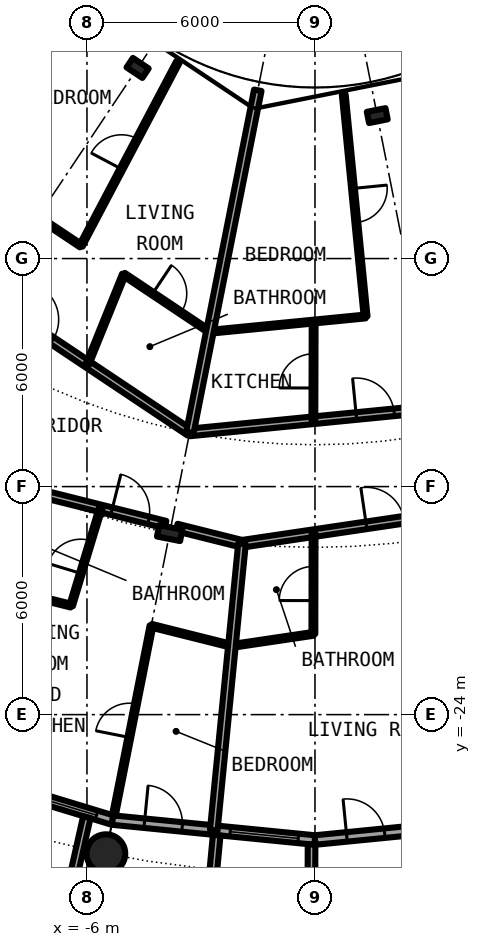
"""IFC4 building model, lengths in metres.
Left out: names, types, materials, properties, quantities, classifications, styles, units other than length and angle.
Written with IfcOpenShell. Run it as: python <this file> out.ifc"""

import sys

from ifc_helpers import new_model, si_unit, direction, frame, frame_2d, origin, origin_2d, place, context, subcontext, project, spatial, rectangle, hollow_circle, i_section, extrude, element, fill, save


model = new_model("IFC4")
c1 = context("Model", 3, precision=1e-05, world=origin(), true_north=direction((0.0, 1.0)))
c2 = subcontext(c1, "Body", "Model", "MODEL_VIEW")
j1 = project(units=[si_unit("LENGTHUNIT", "METRE"), si_unit("PLANEANGLEUNIT", "RADIAN")], contexts=[c1])
p1 = place(None, origin())
s1 = spatial("IfcSite", under=j1, at=p1, CompositionType="ELEMENT")
p2 = place(p1, origin())
s2 = spatial("IfcBuilding", under=s1, at=p2, CompositionType="ELEMENT")
p3 = place(p2, frame((0.0, 0.0, 35.0)))
s3 = spatial("IfcBuildingStorey", under=s2, at=p3, CompositionType="ELEMENT", Elevation=35.0)
p4 = place(p3, frame((-5.501, -27.658, 0.0), z_axis=(0.0, 0.0, 1.0), x_axis=(1.0, 0.0, 0.0)))
e1 = element("IfcColumn", 1, at=p4, inside=s3, PredefinedType="COLUMN", context=c2, shape_type="SweptSolid", body=[
    extrude(hollow_circle(Radius=0.508, WallThickness=0.05, at=origin_2d()), origin(), (0.0, 0.0, 1.0), 3.05),
])
p5 = place(p3, frame((-3.824, -19.223, 0.0), z_axis=(0.0, 0.0, 1.0), x_axis=(-0.195090322016, -0.980785280403, 0.0)))
e2 = element("IfcColumn", 2, at=p5, inside=s3, PredefinedType="COLUMN", context=c2, shape_type="SweptSolid", body=[
    extrude(i_section(OverallWidth=0.305, OverallDepth=0.62, WebThickness=0.021, FlangeThickness=0.04, FilletRadius=0.027, at=origin_2d()), origin(), (0.0, 0.0, 1.0), 3.05),
])
for number, where, z_axis, x_axis in (
    (3, (-4.667, -6.984, 0.0), (0.0, 0.0, 1.0), (-0.556, -0.831, 0.0)),
    (4, (1.639, -8.239, 0.0), (0.0, 0.0, 1.0), (0.195, -0.981, 0.0)),
):
    element("IfcColumn", number, at=place(p3, frame(where, z_axis=z_axis, x_axis=x_axis)), inside=s3, PredefinedType="COLUMN", context=c2, shape_type="SweptSolid", body=[
        extrude(i_section(OverallWidth=0.3, OverallDepth=0.5, WebThickness=0.014, FlangeThickness=0.028, FilletRadius=0.027, at=origin_2d()), origin(), (0.0, 0.0, 1.0), 3.05),
    ])
p6 = place(p3, frame((-10.447, -25.222, 0.0), z_axis=(0.0, 0.0, 1.0), x_axis=(0.956965678721, -0.290201119486, 0.0)))
e5 = element("IfcWall", 5, at=p6, inside=s3, PredefinedType="SOLIDWALL", context=c2, shape_type="SweptSolid", body=[
    extrude(rectangle(XDim=5.351, YDim=0.25, at=frame_2d((2.676, 0.0))), origin(), (0.0, 0.0, 1.0), 2.7),
])
p7 = place(p6, frame((0.841, 0.0, 0.0)))
e6 = element("IfcOpeningElement", 6, at=p7, cuts=e5, PredefinedType="OPENING", context=c2, shape_type="SweptSolid", body=[
    extrude(rectangle(XDim=1.0, YDim=2.2, at=frame_2d((0.5, 1.1))), frame((0.0, 0.135, 0.0), z_axis=(0.0, -1.0, 0.0), x_axis=(1.0, 0.0, 0.0)), (0.0, 0.0, 1.0), 0.27),
])
p8 = place(p6, frame((3.111, 0.0, 0.3)))
e7 = element("IfcOpeningElement", 7, at=p8, cuts=e5, PredefinedType="OPENING", context=c2, shape_type="SweptSolid", body=[
    extrude(rectangle(XDim=1.8, YDim=2.1, at=frame_2d((0.9, 1.05))), frame((0.0, 0.135, 0.0), z_axis=(0.0, -1.0, 0.0), x_axis=(1.0, 0.0, 0.0)), (0.0, 0.0, 1.0), 0.27),
])
p9 = place(p3, frame((-6.004, -26.7, -0.03), z_axis=(0.0, 0.0, 1.0), x_axis=(-0.219609259383, -0.975587911566, 0.0)))
e8 = element("IfcWall", 8, at=p9, inside=s3, PredefinedType="SOLIDWALL", context=c2, shape_type="SweptSolid", body=[
    extrude(rectangle(XDim=2.933, YDim=0.2, at=frame_2d((1.466, 0.0))), origin(), (0.0, 0.0, 1.0), 2.73),
])
p10 = place(p3, frame((-5.326, -26.775, 0.0), z_axis=(0.0, 0.0, 1.0), x_axis=(0.995173996315, -0.098126026407, 0.0)))
e9 = element("IfcWall", 9, at=p10, inside=s3, PredefinedType="SOLIDWALL", context=c2, shape_type="SweptSolid", body=[
    extrude(rectangle(XDim=5.352, YDim=0.25, at=frame_2d((2.676, 0.0))), origin(), (0.0, 0.0, 1.0), 2.7),
])
p11 = place(p10, frame((0.841, 0.0, 0.0)))
e10 = element("IfcOpeningElement", 10, at=p11, cuts=e9, PredefinedType="OPENING", context=c2, shape_type="SweptSolid", body=[
    extrude(rectangle(XDim=1.0, YDim=2.2, at=frame_2d((0.5, 1.1))), frame((0.0, 0.135, 0.0), z_axis=(0.0, -1.0, 0.0), x_axis=(1.0, 0.0, 0.0)), (0.0, 0.0, 1.0), 0.27),
])
p12 = place(p10, frame((3.111, 0.0, 0.3)))
e11 = element("IfcOpeningElement", 11, at=p12, cuts=e9, PredefinedType="OPENING", context=c2, shape_type="SweptSolid", body=[
    extrude(rectangle(XDim=1.8, YDim=2.1, at=frame_2d((0.9, 1.05))), frame((0.0, 0.135, 0.0), z_axis=(0.0, -1.0, 0.0), x_axis=(1.0, 0.0, 0.0)), (0.0, 0.0, 1.0), 0.27),
])
p13 = place(p3, frame((-2.586, -27.171, -0.03), z_axis=(0.0, 0.0, 1.0), x_axis=(-0.094548432284, -0.995520262954, 0.0)))
e12 = element("IfcWall", 12, at=p13, inside=s3, PredefinedType="SOLIDWALL", context=c2, shape_type="SweptSolid", body=[
    extrude(rectangle(XDim=3.006, YDim=0.2, at=frame_2d((1.503, 0.0))), origin(), (0.0, 0.0, 1.0), 2.73),
])
p14 = place(p3, frame((-0.09, -27.417, -0.03), z_axis=(0.0, 0.0, 1.0), x_axis=(-0.00347308367, -0.999993968827, 0.0)))
e13 = element("IfcWall", 13, at=p14, inside=s3, PredefinedType="SOLIDWALL", context=c2, shape_type="SweptSolid", body=[
    extrude(rectangle(XDim=2.882, YDim=0.2, at=frame_2d((1.441, 0.0))), origin(), (0.0, 0.0, 1.0), 2.73),
])
p15 = place(p3, frame((0.0, -27.3, 0.0), z_axis=(0.0, 0.0, 1.0), x_axis=(0.995173996315, 0.098126026407, 0.0)))
e14 = element("IfcWall", 14, at=p15, inside=s3, PredefinedType="SOLIDWALL", context=c2, shape_type="SweptSolid", body=[
    extrude(rectangle(XDim=5.352, YDim=0.25, at=frame_2d((2.676, 0.0))), origin(), (0.0, 0.0, 1.0), 2.7),
])
p16 = place(p15, frame((0.841, 0.0, 0.0)))
e15 = element("IfcOpeningElement", 15, at=p16, cuts=e14, PredefinedType="OPENING", context=c2, shape_type="SweptSolid", body=[
    extrude(rectangle(XDim=1.0, YDim=2.2, at=frame_2d((0.5, 1.1))), frame((0.0, 0.135, 0.0), z_axis=(0.0, -1.0, 0.0), x_axis=(1.0, 0.0, 0.0)), (0.0, 0.0, 1.0), 0.27),
])
p17 = place(p15, frame((3.111, 0.0, 0.3)))
e16 = element("IfcOpeningElement", 16, at=p17, cuts=e14, PredefinedType="OPENING", context=c2, shape_type="SweptSolid", body=[
    extrude(rectangle(XDim=1.8, YDim=2.1, at=frame_2d((0.9, 1.05))), frame((0.0, 0.135, 0.0), z_axis=(0.0, -1.0, 0.0), x_axis=(1.0, 0.0, 0.0)), (0.0, 0.0, 1.0), 0.27),
])
for number, where, z_axis, x_axis in (
    (17, (-8.534, -20.603, 0.0), (0.0, 0.0, 1.0), (0.97, -0.243, 0.0)),
    (18, (-4.302, -21.663, 0.0), (0.0, 0.0, 1.0), (0.97, -0.243, 0.0)),
):
    element("IfcWall", number, at=place(p3, frame(where, z_axis=z_axis, x_axis=x_axis)), inside=s3, PredefinedType="PARTITIONING", context=c2, shape_type="SweptSolid", body=[
        extrude(rectangle(XDim=2.181, YDim=0.1, at=frame_2d((1.091, 0.0))), origin(), (0.0, 0.0, 1.0), 2.7),
    ])
p18 = place(p3, frame((-2.186, -22.193, 0.0), z_axis=(0.0, 0.0, 1.0), x_axis=(0.989171386505, 0.146765009863, 0.0)))
e19 = element("IfcWall", 19, at=p18, inside=s3, PredefinedType="PARTITIONING", context=c2, shape_type="SweptSolid", body=[
    extrude(rectangle(XDim=2.167, YDim=0.1, at=frame_2d((1.084, 0.0))), origin(), (0.0, 0.0, 1.0), 2.7),
])
p19 = place(p3, frame((-7.501, -18.108, 0.0), z_axis=(0.0, 0.0, 1.0), x_axis=(0.970040840928, -0.242941900323, 0.0)))
e20 = element("IfcWall", 20, at=p19, inside=s3, PredefinedType="PARTITIONING", context=c2, shape_type="SweptSolid", body=[
    extrude(rectangle(XDim=3.676, YDim=0.2, at=frame_2d((1.838, 0.0))), origin(), (0.0, 0.0, 1.0), 2.38),
])
p20 = place(p19, frame((2.217, 0.0, 0.0)))
e21 = element("IfcOpeningElement", 21, at=p20, cuts=e20, PredefinedType="OPENING", context=c2, shape_type="SweptSolid", body=[
    extrude(rectangle(XDim=1.0, YDim=2.3, at=frame_2d((0.5, 1.15))), frame((0.0, 0.11, 0.0), z_axis=(0.0, -1.0, 0.0), x_axis=(1.0, 0.0, 0.0)), (0.0, 0.0, 1.0), 0.22),
])
p21 = place(p3, frame((-3.639, -19.076, 0.0), z_axis=(0.0, 0.0, 1.0), x_axis=(0.970053237222, -0.242892397895, 0.0)))
e22 = element("IfcWall", 22, at=p21, inside=s3, PredefinedType="PARTITIONING", context=c2, shape_type="SweptSolid", body=[
    extrude(rectangle(XDim=1.771, YDim=0.2, at=frame_2d((0.885, 0.0))), origin(), (0.0, 0.0, 1.0), 2.38),
])
p22 = place(p3, frame((-1.927, -19.506, 0.0), z_axis=(0.0, 0.0, 1.0), x_axis=(0.989181308547, 0.146698121399, 0.0)))
e23 = element("IfcWall", 23, at=p22, inside=s3, PredefinedType="PARTITIONING", context=c2, shape_type="SweptSolid", body=[
    extrude(rectangle(XDim=9.531, YDim=0.2, at=frame_2d((4.766, 0.0))), origin(), (0.0, 0.0, 1.0), 2.38),
])
p23 = place(p22, frame((3.316, 0.0, 0.0)))
e24 = element("IfcOpeningElement", 24, at=p23, cuts=e23, PredefinedType="OPENING", context=c2, shape_type="SweptSolid", body=[
    extrude(rectangle(XDim=1.0, YDim=2.3, at=frame_2d((0.5, 1.15))), frame((0.0, 0.11, 0.0), z_axis=(0.0, -1.0, 0.0), x_axis=(1.0, 0.0, 0.0)), (0.0, 0.0, 1.0), 0.22),
])
p24 = place(p3, frame((-3.297, -16.575, 0.0), z_axis=(0.0, 0.0, 1.0), x_axis=(0.995201860711, 0.097843019361, 0.0)))
e25 = element("IfcWall", 25, at=p24, inside=s3, PredefinedType="PARTITIONING", context=c2, shape_type="SweptSolid", body=[
    extrude(rectangle(XDim=9.811, YDim=0.2, at=frame_2d((4.906, 0.0))), origin(), (0.0, 0.0, 1.0), 2.7),
])
p25 = place(p24, frame((4.406, 0.0, 0.0)))
e26 = element("IfcOpeningElement", 26, at=p25, cuts=e25, PredefinedType="OPENING", context=c2, shape_type="SweptSolid", body=[
    extrude(rectangle(XDim=1.0, YDim=2.3, at=frame_2d((0.5, 1.15))), frame((0.0, 0.11, 0.0), z_axis=(0.0, -1.0, 0.0), x_axis=(1.0, 0.0, 0.0)), (0.0, 0.0, 1.0), 0.22),
])
p26 = place(p3, frame((-14.036, -9.402, 0.0), z_axis=(0.0, 0.0, 1.0), x_axis=(0.831561346449, -0.555432918625, 0.0)))
e27 = element("IfcWall", 27, at=p26, inside=s3, PredefinedType="PARTITIONING", context=c2, shape_type="SweptSolid", body=[
    extrude(rectangle(XDim=12.914, YDim=0.2, at=frame_2d((6.457, 0.0))), origin(), (0.0, 0.0, 1.0), 2.7),
])
p27 = place(p26, frame((7.566, 0.0, 0.0)))
e28 = element("IfcOpeningElement", 28, at=p27, cuts=e27, PredefinedType="OPENING", context=c2, shape_type="SweptSolid", body=[
    extrude(rectangle(XDim=1.0, YDim=2.3, at=frame_2d((0.5, 1.15))), frame((0.0, 0.11, 0.0), z_axis=(0.0, -1.0, 0.0), x_axis=(1.0, 0.0, 0.0)), (0.0, 0.0, 1.0), 0.22),
])
p28 = place(p3, frame((-2.772, -13.927, 0.0), z_axis=(0.0, 0.0, 1.0), x_axis=(0.995206960104, 0.097791137432, 0.0)))
e29 = element("IfcWall", 29, at=p28, inside=s3, PredefinedType="PARTITIONING", context=c2, shape_type="SweptSolid", body=[
    extrude(rectangle(XDim=4.122, YDim=0.1, at=frame_2d((2.061, 0.0))), origin(), (0.0, 0.0, 1.0), 2.7),
])
p29 = place(p3, frame((-9.545, -9.401, 0.0), z_axis=(0.0, 0.0, 1.0), x_axis=(0.831459707426, -0.555585056429, 0.0)))
e30 = element("IfcWall", 30, at=p29, inside=s3, PredefinedType="PARTITIONING", context=c2, shape_type="SweptSolid", body=[
    extrude(rectangle(XDim=4.073, YDim=0.1, at=frame_2d((2.037, 0.0))), origin(), (0.0, 0.0, 1.0), 2.7),
])
p30 = place(p3, frame((-5.029, -12.418, 0.0), z_axis=(0.0, 0.0, 1.0), x_axis=(0.831538390496, -0.555467285384, 0.0)))
e31 = element("IfcWall", 31, at=p30, inside=s3, PredefinedType="PARTITIONING", context=c2, shape_type="SweptSolid", body=[
    extrude(rectangle(XDim=2.717, YDim=0.1, at=frame_2d((1.358, 0.0))), origin(), (0.0, 0.0, 1.0), 2.7),
])
p31 = place(p30, frame((0.908, 0.0, 0.0)))
e32 = element("IfcOpeningElement", 32, at=p31, cuts=e31, PredefinedType="OPENING", context=c2, shape_type="SweptSolid", body=[
    extrude(rectangle(XDim=0.9, YDim=2.3, at=frame_2d((0.45, 1.15))), frame((0.0, 0.06, 0.0), z_axis=(0.0, -1.0, 0.0), x_axis=(1.0, 0.0, 0.0)), (0.0, 0.0, 1.0), 0.12),
])
p32 = place(p3, frame((-6.418, -21.133, 0.0), z_axis=(0.0, 0.0, 1.0), x_axis=(0.290478618436, 0.956881482855, 0.0)))
e33 = element("IfcWall", 33, at=p32, inside=s3, PredefinedType="PARTITIONING", context=c2, shape_type="SweptSolid", body=[
    extrude(rectangle(XDim=2.674, YDim=0.1, at=frame_2d((1.337, 0.0))), origin(), (0.0, 0.0, 1.0), 2.7),
])
p33 = place(p32, frame((0.887, 0.0, 0.0)))
e34 = element("IfcOpeningElement", 34, at=p33, cuts=e33, PredefinedType="OPENING", context=c2, shape_type="SweptSolid", body=[
    extrude(rectangle(XDim=0.9, YDim=2.3, at=frame_2d((0.45, 1.15))), frame((0.0, 0.06, 0.0), z_axis=(0.0, -1.0, 0.0), x_axis=(1.0, 0.0, 0.0)), (0.0, 0.0, 1.0), 0.12),
])
p34 = place(p3, frame((-6.159, -11.663, 0.0), z_axis=(0.0, 0.0, 1.0), x_axis=(0.466976820365, 0.884269556889, 0.0)))
e35 = element("IfcWall", 35, at=p34, inside=s3, PredefinedType="PARTITIONING", context=c2, shape_type="SweptSolid", body=[
    extrude(rectangle(XDim=5.469, YDim=0.1, at=frame_2d((2.735, 0.0))), origin(), (0.0, 0.0, 1.0), 2.7),
])
p35 = place(p34, frame((2.284, 0.0, 0.0)))
e36 = element("IfcOpeningElement", 36, at=p35, cuts=e35, PredefinedType="OPENING", context=c2, shape_type="SweptSolid", body=[
    extrude(rectangle(XDim=0.9, YDim=2.3, at=frame_2d((0.45, 1.15))), frame((0.0, 0.06, 0.0), z_axis=(0.0, -1.0, 0.0), x_axis=(1.0, 0.0, 0.0)), (0.0, 0.0, 1.0), 0.12),
])
p36 = place(p3, frame((-5.986, -14.779, 0.0), z_axis=(0.0, 0.0, 1.0), x_axis=(0.375649498413, 0.926761811008, 0.0)))
e37 = element("IfcWall", 37, at=p36, inside=s3, PredefinedType="PARTITIONING", context=c2, shape_type="SweptSolid", body=[
    extrude(rectangle(XDim=2.548, YDim=0.1, at=frame_2d((1.274, 0.0))), origin(), (0.0, 0.0, 1.0), 2.7),
])
p37 = place(p3, frame((-5.293, -26.655, 0.0), z_axis=(0.0, 0.0, 1.0), x_axis=(0.194713709563, 0.980860118115, 0.0)))
e38 = element("IfcWall", 38, at=p37, inside=s3, PredefinedType="PARTITIONING", context=c2, shape_type="SweptSolid", body=[
    extrude(rectangle(XDim=5.089, YDim=0.1, at=frame_2d((2.545, 0.0))), origin(), (0.0, 0.0, 1.0), 2.7),
])
p38 = place(p37, frame((2.095, 0.0, 0.0)))
e39 = element("IfcOpeningElement", 39, at=p38, cuts=e38, PredefinedType="OPENING", context=c2, shape_type="SweptSolid", body=[
    extrude(rectangle(XDim=0.9, YDim=2.3, at=frame_2d((0.45, 1.15))), frame((0.0, 0.06, 0.0), z_axis=(0.0, -1.0, 0.0), x_axis=(1.0, 0.0, 0.0)), (0.0, 0.0, 1.0), 0.12),
])
p39 = place(p3, frame((-3.292, -16.576, 0.0), z_axis=(0.0, 0.0, 1.0), x_axis=(0.194683825545, 0.980866050015, 0.0)))
e40 = element("IfcWall", 40, at=p39, inside=s3, PredefinedType="PARTITIONING", context=c2, shape_type="SweptSolid", body=[
    extrude(rectangle(XDim=9.179, YDim=0.2, at=frame_2d((4.59, 0.0))), origin(), (0.0, 0.0, 1.0), 2.7),
])
p40 = place(p3, frame((-2.664, -27.044, 0.0), z_axis=(0.0, 0.0, 1.0), x_axis=(0.098115395479, 0.995175044487, 0.0)))
e41 = element("IfcWall", 41, at=p40, inside=s3, PredefinedType="PARTITIONING", context=c2, shape_type="SweptSolid", body=[
    extrude(rectangle(XDim=7.574, YDim=0.2, at=frame_2d((3.787, 0.0))), origin(), (0.0, 0.0, 1.0), 2.7),
])
p41 = place(p3, frame((-0.042, -21.875, 0.0), z_axis=(0.0, 0.0, 1.0), x_axis=(0.001843314841, 0.999998301094, 0.0)))
e42 = element("IfcWall", 42, at=p41, inside=s3, PredefinedType="PARTITIONING", context=c2, shape_type="SweptSolid", body=[
    extrude(rectangle(XDim=2.649, YDim=0.1, at=frame_2d((1.324, 0.0))), origin(), (0.0, 0.0, 1.0), 2.7),
])
p42 = place(p41, frame((0.875, 0.0, 0.0)))
e43 = element("IfcOpeningElement", 43, at=p42, cuts=e42, PredefinedType="OPENING", context=c2, shape_type="SweptSolid", body=[
    extrude(rectangle(XDim=0.9, YDim=2.3, at=frame_2d((0.45, 1.15))), frame((0.0, 0.06, 0.0), z_axis=(0.0, -1.0, 0.0), x_axis=(1.0, 0.0, 0.0)), (0.0, 0.0, 1.0), 0.12),
])
p43 = place(p3, frame((-0.042, -16.255, 0.0), z_axis=(0.0, 0.0, 1.0), x_axis=(0.00272632248, 0.999996283576, 0.0)))
e44 = element("IfcWall", 44, at=p43, inside=s3, PredefinedType="PARTITIONING", context=c2, shape_type="SweptSolid", body=[
    extrude(rectangle(XDim=2.597, YDim=0.1, at=frame_2d((1.298, 0.0))), origin(), (0.0, 0.0, 1.0), 2.7),
])
p44 = place(p43, frame((0.849, 0.0, 0.0)))
e45 = element("IfcOpeningElement", 45, at=p44, cuts=e44, PredefinedType="OPENING", context=c2, shape_type="SweptSolid", body=[
    extrude(rectangle(XDim=0.9, YDim=2.3, at=frame_2d((0.45, 1.15))), frame((0.0, 0.06, 0.0), z_axis=(0.0, -1.0, 0.0), x_axis=(1.0, 0.0, 0.0)), (0.0, 0.0, 1.0), 0.12),
])
p45 = place(p3, frame((0.757, -7.683, 0.0), z_axis=(0.0, 0.0, 1.0), x_axis=(0.097979463572, -0.995188436789, 0.0)))
e46 = element("IfcWall", 46, at=p45, inside=s3, PredefinedType="PARTITIONING", context=c2, shape_type="SweptSolid", body=[
    extrude(rectangle(XDim=5.868, YDim=0.1, at=frame_2d((2.934, 0.0))), origin(), (0.0, 0.0, 1.0), 2.7),
])
p46 = place(p45, frame((2.484, 0.0, 0.0)))
e47 = element("IfcOpeningElement", 47, at=p46, cuts=e46, PredefinedType="OPENING", context=c2, shape_type="SweptSolid", body=[
    extrude(rectangle(XDim=0.9, YDim=2.3, at=frame_2d((0.45, 1.15))), frame((0.0, 0.06, 0.0), z_axis=(0.0, -1.0, 0.0), x_axis=(1.0, 0.0, 0.0)), (0.0, 0.0, 1.0), 0.12),
])
p47 = place(p8, origin())
e48 = element("IfcWindow", 48, at=p47, inside=s3, PartitioningType="SINGLE_PANEL", PredefinedType="WINDOW", context=c2, shape_type="SweptSolid", body=[
    extrude(rectangle(XDim=1.8, YDim=2.1, at=frame_2d((0.9, 1.05))), frame((0.0, 0.03, 0.0), z_axis=(0.0, -1.0, 0.0), x_axis=(1.0, 0.0, 0.0)), (0.0, 0.0, 1.0), 0.06),
])
fill(e7, e48)
p48 = place(p11, origin())
e49 = element("IfcDoor", 49, at=p48, inside=s3, OperationType="SINGLE_SWING_LEFT", PredefinedType="DOOR", context=c2, shape_type="SweptSolid", body=[
    extrude(rectangle(XDim=1.0, YDim=2.2, at=frame_2d((0.5, 1.1))), frame((0.0, 0.025, 0.0), z_axis=(0.0, -1.0, 0.0), x_axis=(1.0, 0.0, 0.0)), (0.0, 0.0, 1.0), 0.05),
])
fill(e10, e49)
p49 = place(p12, origin())
e50 = element("IfcWindow", 50, at=p49, inside=s3, PartitioningType="SINGLE_PANEL", PredefinedType="WINDOW", context=c2, shape_type="SweptSolid", body=[
    extrude(rectangle(XDim=1.8, YDim=2.1, at=frame_2d((0.9, 1.05))), frame((0.0, 0.03, 0.0), z_axis=(0.0, -1.0, 0.0), x_axis=(1.0, 0.0, 0.0)), (0.0, 0.0, 1.0), 0.06),
])
fill(e11, e50)
p50 = place(p16, origin())
e51 = element("IfcDoor", 51, at=p50, inside=s3, OperationType="SINGLE_SWING_LEFT", PredefinedType="DOOR", context=c2, shape_type="SweptSolid", body=[
    extrude(rectangle(XDim=1.0, YDim=2.2, at=frame_2d((0.5, 1.1))), frame((0.0, 0.025, 0.0), z_axis=(0.0, -1.0, 0.0), x_axis=(1.0, 0.0, 0.0)), (0.0, 0.0, 1.0), 0.05),
])
fill(e15, e51)
p51 = place(p20, origin())
e52 = element("IfcDoor", 52, at=p51, inside=s3, OperationType="SINGLE_SWING_RIGHT", PredefinedType="DOOR", context=c2, shape_type="SweptSolid", body=[
    extrude(rectangle(XDim=1.0, YDim=2.3, at=frame_2d((0.5, 1.15))), frame((0.0, 0.025, 0.0), z_axis=(0.0, -1.0, 0.0), x_axis=(1.0, 0.0, 0.0)), (0.0, 0.0, 1.0), 0.05),
])
fill(e21, e52)
p52 = place(p33, origin())
e53 = element("IfcDoor", 53, at=p52, inside=s3, OperationType="SINGLE_SWING_LEFT", PredefinedType="DOOR", context=c2, shape_type="SweptSolid", body=[
    extrude(rectangle(XDim=0.9, YDim=2.3, at=frame_2d((0.45, 1.15))), frame((0.0, 0.025, 0.0), z_axis=(0.0, -1.0, 0.0), x_axis=(1.0, 0.0, 0.0)), (0.0, 0.0, 1.0), 0.05),
])
fill(e34, e53)
p53 = place(p38, origin())
e54 = element("IfcDoor", 54, at=p53, inside=s3, OperationType="SINGLE_SWING_RIGHT", PredefinedType="DOOR", context=c2, shape_type="SweptSolid", body=[
    extrude(rectangle(XDim=0.9, YDim=2.3, at=frame_2d((0.45, 1.15))), frame((0.0, 0.025, 0.0), z_axis=(0.0, -1.0, 0.0), x_axis=(1.0, 0.0, 0.0)), (0.0, 0.0, 1.0), 0.05),
])
fill(e39, e54)
p54 = place(p23, origin())
e55 = element("IfcDoor", 55, at=p54, inside=s3, OperationType="SINGLE_SWING_LEFT", PredefinedType="DOOR", context=c2, shape_type="SweptSolid", body=[
    extrude(rectangle(XDim=1.0, YDim=2.3, at=frame_2d((0.5, 1.15))), frame((0.0, 0.025, 0.0), z_axis=(0.0, -1.0, 0.0), x_axis=(1.0, 0.0, 0.0)), (0.0, 0.0, 1.0), 0.05),
])
fill(e24, e55)
p55 = place(p42, origin())
e56 = element("IfcDoor", 56, at=p55, inside=s3, OperationType="SINGLE_SWING_RIGHT", PredefinedType="DOOR", context=c2, shape_type="SweptSolid", body=[
    extrude(rectangle(XDim=0.9, YDim=2.3, at=frame_2d((0.45, 1.15))), frame((0.0, 0.025, 0.0), z_axis=(0.0, -1.0, 0.0), x_axis=(1.0, 0.0, 0.0)), (0.0, 0.0, 1.0), 0.05),
])
fill(e43, e56)
p56 = place(p27, origin())
e57 = element("IfcDoor", 57, at=p56, inside=s3, OperationType="SINGLE_SWING_RIGHT", PredefinedType="DOOR", context=c2, shape_type="SweptSolid", body=[
    extrude(rectangle(XDim=1.0, YDim=2.3, at=frame_2d((0.5, 1.15))), frame((0.0, 0.025, 0.0), z_axis=(0.0, -1.0, 0.0), x_axis=(1.0, 0.0, 0.0)), (0.0, 0.0, 1.0), 0.05),
])
fill(e28, e57)
p57 = place(p31, origin())
e58 = element("IfcDoor", 58, at=p57, inside=s3, OperationType="SINGLE_SWING_LEFT", PredefinedType="DOOR", context=c2, shape_type="SweptSolid", body=[
    extrude(rectangle(XDim=0.9, YDim=2.3, at=frame_2d((0.45, 1.15))), frame((0.0, 0.025, 0.0), z_axis=(0.0, -1.0, 0.0), x_axis=(1.0, 0.0, 0.0)), (0.0, 0.0, 1.0), 0.05),
])
fill(e32, e58)
p58 = place(p35, origin())
e59 = element("IfcDoor", 59, at=p58, inside=s3, OperationType="SINGLE_SWING_LEFT", PredefinedType="DOOR", context=c2, shape_type="SweptSolid", body=[
    extrude(rectangle(XDim=0.9, YDim=2.3, at=frame_2d((0.45, 1.15))), frame((0.0, 0.025, 0.0), z_axis=(0.0, -1.0, 0.0), x_axis=(1.0, 0.0, 0.0)), (0.0, 0.0, 1.0), 0.05),
])
fill(e36, e59)
p59 = place(p25, origin())
e60 = element("IfcDoor", 60, at=p59, inside=s3, OperationType="SINGLE_SWING_RIGHT", PredefinedType="DOOR", context=c2, shape_type="SweptSolid", body=[
    extrude(rectangle(XDim=1.0, YDim=2.3, at=frame_2d((0.5, 1.15))), frame((0.0, 0.025, 0.0), z_axis=(0.0, -1.0, 0.0), x_axis=(1.0, 0.0, 0.0)), (0.0, 0.0, 1.0), 0.05),
])
fill(e26, e60)
p60 = place(p44, origin())
e61 = element("IfcDoor", 61, at=p60, inside=s3, OperationType="SINGLE_SWING_RIGHT", PredefinedType="DOOR", context=c2, shape_type="SweptSolid", body=[
    extrude(rectangle(XDim=0.9, YDim=2.3, at=frame_2d((0.45, 1.15))), frame((0.0, 0.025, 0.0), z_axis=(0.0, -1.0, 0.0), x_axis=(1.0, 0.0, 0.0)), (0.0, 0.0, 1.0), 0.05),
])
fill(e45, e61)
p61 = place(p46, origin())
e62 = element("IfcDoor", 62, at=p61, inside=s3, OperationType="SINGLE_SWING_RIGHT", PredefinedType="DOOR", context=c2, shape_type="SweptSolid", body=[
    extrude(rectangle(XDim=0.9, YDim=2.3, at=frame_2d((0.45, 1.15))), frame((0.0, 0.025, 0.0), z_axis=(0.0, -1.0, 0.0), x_axis=(1.0, 0.0, 0.0)), (0.0, 0.0, 1.0), 0.05),
])
fill(e47, e62)
save(model, sys.argv[1])
